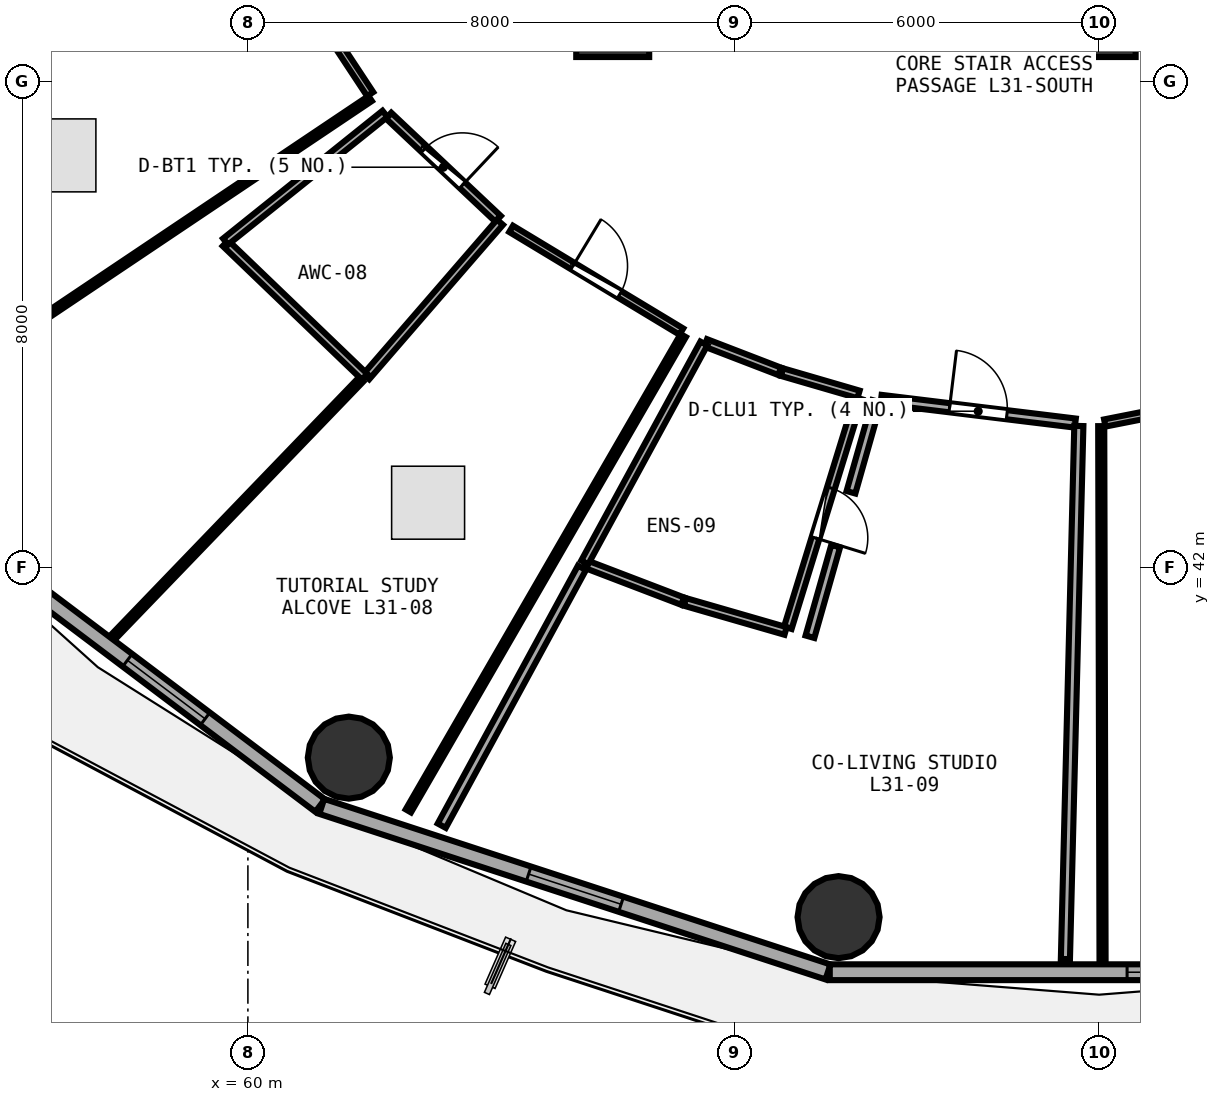
"""IFC4 building model, lengths in metres.
Left out: names, types, materials, properties, quantities, classifications, styles, units other than length and angle.
Written with IfcOpenShell. Run it as: python <this file> out.ifc"""

import sys

from ifc_helpers import new_model, si_unit, direction, frame, frame_2d, origin, origin_2d, place, context, subcontext, project, spatial, rectangle, circle, extrude, element, fill, save


model = new_model("IFC4")
c1 = context("Model", 3, precision=1e-05, world=origin(), true_north=direction((0.0, 1.0)))
c2 = subcontext(c1, "Body", "Model", "MODEL_VIEW")
j1 = project(units=[si_unit("LENGTHUNIT", "METRE"), si_unit("PLANEANGLEUNIT", "RADIAN")], contexts=[c1])
p1 = place(None, origin())
s1 = spatial("IfcSite", under=j1, at=p1, CompositionType="ELEMENT")
p2 = place(p1, origin())
s2 = spatial("IfcBuilding", under=s1, at=p2, CompositionType="ELEMENT")
p3 = place(p2, frame((0.0, 0.0, 121.35)))
s3 = spatial("IfcBuildingStorey", under=s2, at=p3, CompositionType="ELEMENT", Elevation=121.35)
for number, where, z_axis, x_axis in (
    (1, (66.0, 51.0, 0.0), (0.0, 0.0, 1.0), (1.0, 0.0, 0.0)),
    (2, (74.0, 51.0, 0.0), (0.0, 0.0, 1.0), (1.0, 0.0, 0.0)),
):
    element("IfcColumn", number, at=place(p3, frame(where, z_axis=z_axis, x_axis=x_axis)), inside=s3, PredefinedType="PILASTER", context=c2, shape_type="SweptSolid", body=[
        extrude(rectangle(XDim=1.2, YDim=1.2, at=origin_2d()), origin(), (0.0, 0.0, 1.0), 3.75),
    ])
for number, where, z_axis, x_axis in (
    (3, (61.66, 38.878, 0.0), (0.0, 0.0, 1.0), (1.0, 0.0, 0.0)),
    (4, (69.714, 36.255, 0.0), (0.0, 0.0, 1.0), (1.0, 0.0, 0.0)),
):
    element("IfcColumn", number, at=place(p3, frame(where, z_axis=z_axis, x_axis=x_axis)), inside=s3, PredefinedType="COLUMN", context=c2, shape_type="SweptSolid", body=[
        extrude(circle(Radius=0.675, at=origin_2d()), origin(), (0.0, 0.0, 1.0), 3.75),
    ])
p4 = place(p3, frame((54.401, 43.207, 0.0), z_axis=(0.0, 0.0, 1.0), x_axis=(0.798501507879, -0.601992808857, 0.0)))
e5 = element("IfcWall", 5, at=p4, inside=s3, PredefinedType="SOLIDWALL", context=c2, shape_type="SweptSolid", body=[
    extrude(rectangle(XDim=8.499, YDim=0.26, at=frame_2d((4.25, 0.0))), origin(), (0.0, 0.0, 1.0), 3.475),
])
p5 = place(p4, frame((4.53, 0.0, 0.85)))
e6 = element("IfcOpeningElement", 6, at=p5, cuts=e5, PredefinedType="OPENING", context=c2, shape_type="SweptSolid", body=[
    extrude(rectangle(XDim=1.6, YDim=1.45, at=frame_2d((0.8, 0.725))), frame((0.0, 0.14, 0.0), z_axis=(0.0, -1.0, 0.0), x_axis=(1.0, 0.0, 0.0)), (0.0, 0.0, 1.0), 0.28),
])
p6 = place(p3, frame((61.214, 38.077, 0.0), z_axis=(0.0, 0.0, 1.0), x_axis=(0.950471101963, -0.310812941064, 0.0)))
e7 = element("IfcWall", 7, at=p6, inside=s3, PredefinedType="SOLIDWALL", context=c2, shape_type="SweptSolid", body=[
    extrude(rectangle(XDim=8.76, YDim=0.26, at=frame_2d((4.38, 0.0))), origin(), (0.0, 0.0, 1.0), 3.475),
])
p7 = place(p6, frame((3.58, 0.0, 0.85)))
e8 = element("IfcOpeningElement", 8, at=p7, cuts=e7, PredefinedType="OPENING", context=c2, shape_type="SweptSolid", body=[
    extrude(rectangle(XDim=1.6, YDim=1.45, at=frame_2d((0.8, 0.725))), frame((0.0, 0.14, 0.0), z_axis=(0.0, -1.0, 0.0), x_axis=(1.0, 0.0, 0.0)), (0.0, 0.0, 1.0), 0.28),
])
p8 = place(p3, frame((69.57, 35.349, 0.0), z_axis=(0.0, 0.0, 1.0), x_axis=(1.0, 0.0, 0.0)))
e9 = element("IfcWall", 9, at=p8, inside=s3, PredefinedType="SOLIDWALL", context=c2, shape_type="SweptSolid", body=[
    extrude(rectangle(XDim=8.861, YDim=0.26, at=frame_2d((4.43, 0.0))), origin(), (0.0, 0.0, 1.0), 3.475),
])
p9 = place(p8, frame((4.89, 0.0, 0.85)))
e10 = element("IfcOpeningElement", 10, at=p9, cuts=e9, PredefinedType="OPENING", context=c2, shape_type="SweptSolid", body=[
    extrude(rectangle(XDim=1.6, YDim=1.45, at=frame_2d((0.8, 0.725))), frame((0.0, 0.14, 0.0), z_axis=(0.0, -1.0, 0.0), x_axis=(1.0, 0.0, 0.0)), (0.0, 0.0, 1.0), 0.28),
])
p10 = place(p3, frame((60.358, 52.293, 0.0), z_axis=(0.0, 0.0, 1.0), x_axis=(0.551050840628, -0.834471671804, 0.0)))
e11 = element("IfcWall", 11, at=p10, inside=s3, PredefinedType="PARTITIONING", context=c2, shape_type="SweptSolid", body=[
    extrude(rectangle(XDim=3.0, YDim=0.12, at=frame_2d((1.5, 0.0))), origin(), (0.0, 0.0, 1.0), 2.925),
])
p11 = place(p10, frame((1.05, 0.0, 0.0)))
e12 = element("IfcOpeningElement", 12, at=p11, cuts=e11, PredefinedType="OPENING", context=c2, shape_type="SweptSolid", body=[
    extrude(rectangle(XDim=0.9, YDim=2.08, at=frame_2d((0.45, 1.04))), frame((0.0, 0.07, 0.0), z_axis=(0.0, -1.0, 0.0), x_axis=(1.0, 0.0, 0.0)), (0.0, 0.0, 1.0), 0.14),
])
p12 = place(p3, frame((62.314, 49.437, 0.0), z_axis=(0.0, 0.0, 1.0), x_axis=(0.727704720547, -0.68589054498, 0.0)))
e13 = element("IfcWall", 13, at=p12, inside=s3, PredefinedType="PLUMBINGWALL", context=c2, shape_type="SweptSolid", body=[
    extrude(rectangle(XDim=2.476, YDim=0.13, at=frame_2d((1.238, 0.0))), origin(), (0.0, 0.0, 1.0), 2.925),
])
p13 = place(p12, frame((0.808, 0.0, 0.0)))
e14 = element("IfcOpeningElement", 14, at=p13, cuts=e13, PredefinedType="OPENING", context=c2, shape_type="SweptSolid", body=[
    extrude(rectangle(XDim=0.86, YDim=2.05, at=frame_2d((0.43, 1.025))), frame((0.0, 0.075, 0.0), z_axis=(0.0, -1.0, 0.0), x_axis=(1.0, 0.0, 0.0)), (0.0, 0.0, 1.0), 0.15),
])
p14 = place(p3, frame((64.329, 47.574, 0.0), z_axis=(0.0, 0.0, 1.0), x_axis=(0.8562252486, -0.516602674848, 0.0)))
e15 = element("IfcWall", 15, at=p14, inside=s3, PredefinedType="PARTITIONING", context=c2, shape_type="SweptSolid", body=[
    extrude(rectangle(XDim=3.269, YDim=0.12, at=frame_2d((1.635, 0.0))), origin(), (0.0, 0.0, 1.0), 2.925),
])
p15 = place(p14, frame((1.185, 0.0, 0.0)))
e16 = element("IfcOpeningElement", 16, at=p15, cuts=e15, PredefinedType="OPENING", context=c2, shape_type="SweptSolid", body=[
    extrude(rectangle(XDim=0.9, YDim=2.08, at=frame_2d((0.45, 1.04))), frame((0.0, 0.07, 0.0), z_axis=(0.0, -1.0, 0.0), x_axis=(1.0, 0.0, 0.0)), (0.0, 0.0, 1.0), 0.14),
])
p16 = place(p3, frame((70.044, 44.789, 0.0), z_axis=(0.0, 0.0, 1.0), x_axis=(-0.294737077858, -0.955578387646, 0.0)))
e17 = element("IfcWall", 17, at=p16, inside=s3, PredefinedType="PLUMBINGWALL", context=c2, shape_type="SweptSolid", body=[
    extrude(rectangle(XDim=3.951, YDim=0.13, at=frame_2d((1.976, 0.0))), origin(), (0.0, 0.0, 1.0), 3.175),
])
p17 = place(p16, frame((1.545, 0.0, 0.0)))
e18 = element("IfcOpeningElement", 18, at=p17, cuts=e17, PredefinedType="OPENING", context=c2, shape_type="SweptSolid", body=[
    extrude(rectangle(XDim=0.86, YDim=2.05, at=frame_2d((0.43, 1.025))), frame((0.0, 0.075, 0.0), z_axis=(0.0, -1.0, 0.0), x_axis=(1.0, 0.0, 0.0)), (0.0, 0.0, 1.0), 0.15),
])
p18 = place(p3, frame((70.414, 44.77, 0.0), z_axis=(0.0, 0.0, 1.0), x_axis=(0.992649213004, -0.12102702146, 0.0)))
e19 = element("IfcWall", 19, at=p18, inside=s3, PredefinedType="PARTITIONING", context=c2, shape_type="SweptSolid", body=[
    extrude(rectangle(XDim=3.218, YDim=0.15, at=frame_2d((1.609, 0.0))), origin(), (0.0, 0.0, 1.0), 3.48),
])
p19 = place(p18, frame((1.134, 0.0, 0.0)))
e20 = element("IfcOpeningElement", 20, at=p19, cuts=e19, PredefinedType="OPENING", context=c2, shape_type="SweptSolid", body=[
    extrude(rectangle(XDim=0.95, YDim=2.08, at=frame_2d((0.475, 1.04))), frame((0.0, 0.085, 0.0), z_axis=(0.0, -1.0, 0.0), x_axis=(1.0, 0.0, 0.0)), (0.0, 0.0, 1.0), 0.17),
])
p20 = place(p3, frame((74.093, 44.382, 0.0), z_axis=(0.0, 0.0, 1.0), x_axis=(0.981035031673, 0.193830510061, 0.0)))
e21 = element("IfcWall", 21, at=p20, inside=s3, PredefinedType="PARTITIONING", context=c2, shape_type="SweptSolid", body=[
    extrude(rectangle(XDim=6.184, YDim=0.12, at=frame_2d((3.092, 0.0))), origin(), (0.0, 0.0, 1.0), 3.235),
])
p21 = place(p20, frame((2.642, 0.0, 0.0)))
e22 = element("IfcOpeningElement", 22, at=p21, cuts=e21, PredefinedType="OPENING", context=c2, shape_type="SweptSolid", body=[
    extrude(rectangle(XDim=0.9, YDim=2.08, at=frame_2d((0.45, 1.04))), frame((0.0, 0.07, 0.0), z_axis=(0.0, -1.0, 0.0), x_axis=(1.0, 0.0, 0.0)), (0.0, 0.0, 1.0), 0.14),
])
p22 = place(p3, frame((62.011, 49.718, 0.0), z_axis=(0.0, 0.0, 1.0), x_axis=(-0.830433607217, -0.557117603388, 0.0)))
e23 = element("IfcWall", 23, at=p22, inside=s3, PredefinedType="PARTITIONING", context=c2, shape_type="SweptSolid", body=[
    extrude(rectangle(XDim=9.546, YDim=0.1, at=frame_2d((4.773, 0.0))), origin(), (0.0, 0.0, 1.0), 2.975),
])
p23 = place(p3, frame((51.219, 48.685, 0.0), z_axis=(0.0, 0.0, 1.0), x_axis=(0.927926926295, 0.372762148637, 0.0)))
e24 = element("IfcWall", 24, at=p23, inside=s3, PredefinedType="PARTITIONING", context=c2, shape_type="SweptSolid", body=[
    extrude(rectangle(XDim=6.044, YDim=0.1, at=frame_2d((3.022, 0.0))), origin(), (0.0, 0.0, 1.0), 2.925),
])
p24 = place(p3, frame((64.146, 47.683, 0.0), z_axis=(0.0, 0.0, 1.0), x_axis=(-0.654725816563, -0.75586645985, 0.0)))
e25 = element("IfcWall", 25, at=p24, inside=s3, PredefinedType="PLUMBINGWALL", context=c2, shape_type="SweptSolid", body=[
    extrude(rectangle(XDim=3.36, YDim=0.13, at=frame_2d((1.68, 0.0))), origin(), (0.0, 0.0, 1.0), 3.235),
])
p25 = place(p3, frame((61.919, 45.142, 0.0), z_axis=(0.0, 0.0, 1.0), x_axis=(-0.721319622767, 0.692602340316, 0.0)))
e26 = element("IfcWall", 26, at=p25, inside=s3, PredefinedType="PLUMBINGWALL", context=c2, shape_type="SweptSolid", body=[
    extrude(rectangle(XDim=3.171, YDim=0.13, at=frame_2d((1.585, 0.0))), origin(), (0.0, 0.0, 1.0), 2.925),
])
p26 = place(p3, frame((59.633, 47.365, 0.0), z_axis=(0.0, 0.0, 1.0), x_axis=(0.780343931947, 0.625350579974, 0.0)))
e27 = element("IfcWall", 27, at=p26, inside=s3, PredefinedType="PLUMBINGWALL", context=c2, shape_type="SweptSolid", body=[
    extrude(rectangle(XDim=3.36, YDim=0.13, at=frame_2d((1.68, 0.0))), origin(), (0.0, 0.0, 1.0), 3.235),
])
p27 = place(p3, frame((67.16, 45.819, 0.0), z_axis=(0.0, 0.0, 1.0), x_axis=(-0.500668535271, -0.865639080558, 0.0)))
e28 = element("IfcWall", 28, at=p27, inside=s3, PredefinedType="PARTITIONING", context=c2, shape_type="SweptSolid", body=[
    extrude(rectangle(XDim=9.03, YDim=0.1, at=frame_2d((4.515, 0.0))), origin(), (0.0, 0.0, 1.0), 2.925),
])
p28 = place(p3, frame((57.806, 40.885, 0.0), z_axis=(0.0, 0.0, 1.0), x_axis=(0.693697879067, 0.720266098451, 0.0)))
e29 = element("IfcWall", 29, at=p28, inside=s3, PredefinedType="PARTITIONING", context=c2, shape_type="SweptSolid", body=[
    extrude(rectangle(XDim=5.844, YDim=0.1, at=frame_2d((2.922, 0.0))), origin(), (0.0, 0.0, 1.0), 2.975),
])
p29 = place(p3, frame((67.528, 45.7, 0.0), z_axis=(0.0, 0.0, 1.0), x_axis=(0.933311844858, -0.359066846488, 0.0)))
e30 = element("IfcWall", 30, at=p29, inside=s3, PredefinedType="PLUMBINGWALL", context=c2, shape_type="SweptSolid", body=[
    extrude(rectangle(XDim=1.305, YDim=0.13, at=frame_2d((0.652, 0.0))), origin(), (0.0, 0.0, 1.0), 2.925),
])
p30 = place(p3, frame((68.783, 45.219, 0.0), z_axis=(0.0, 0.0, 1.0), x_axis=(0.960085412009, -0.279706992489, 0.0)))
e31 = element("IfcWall", 31, at=p30, inside=s3, PredefinedType="PLUMBINGWALL", context=c2, shape_type="SweptSolid", body=[
    extrude(rectangle(XDim=1.312, YDim=0.13, at=frame_2d((0.656, 0.0))), origin(), (0.0, 0.0, 1.0), 3.48),
])
p31 = place(p3, frame((68.843, 40.961, 0.0), z_axis=(0.0, 0.0, 1.0), x_axis=(-0.960750273448, 0.277414693321, 0.0)))
e32 = element("IfcWall", 32, at=p31, inside=s3, PredefinedType="PLUMBINGWALL", context=c2, shape_type="SweptSolid", body=[
    extrude(rectangle(XDim=1.723, YDim=0.13, at=frame_2d((0.862, 0.0))), origin(), (0.0, 0.0, 1.0), 2.925),
])
p32 = place(p3, frame((67.149, 41.452, 0.0), z_axis=(0.0, 0.0, 1.0), x_axis=(-0.934103540356, 0.357002207127, 0.0)))
e33 = element("IfcWall", 33, at=p32, inside=s3, PredefinedType="PLUMBINGWALL", context=c2, shape_type="SweptSolid", body=[
    extrude(rectangle(XDim=1.714, YDim=0.13, at=frame_2d((0.857, 0.0))), origin(), (0.0, 0.0, 1.0), 3.48),
])
p33 = place(p3, frame((65.54, 42.089, 0.0), z_axis=(0.0, 0.0, 1.0), x_axis=(0.478075883312, 0.878318535496, 0.0)))
e34 = element("IfcWall", 34, at=p33, inside=s3, PredefinedType="PLUMBINGWALL", context=c2, shape_type="SweptSolid", body=[
    extrude(rectangle(XDim=4.1, YDim=0.13, at=frame_2d((2.05, 0.0))), origin(), (0.0, 0.0, 1.0), 2.925),
])
p34 = place(p3, frame((73.666, 44.333, 0.0), z_axis=(0.0, 0.0, 1.0), x_axis=(-0.025193894125, -0.999682583473, 0.0)))
e35 = element("IfcWall", 35, at=p34, inside=s3, PredefinedType="PARTITIONING", context=c2, shape_type="SweptSolid", body=[
    extrude(rectangle(XDim=8.77, YDim=0.15, at=frame_2d((4.385, 0.0))), origin(), (0.0, 0.0, 1.0), 2.975),
])
p35 = place(p3, frame((63.188, 37.759, 0.0), z_axis=(0.0, 0.0, 1.0), x_axis=(0.477678819353, 0.878534544307, 0.0)))
e36 = element("IfcWall", 36, at=p35, inside=s3, PredefinedType="PARTITIONING", context=c2, shape_type="SweptSolid", body=[
    extrude(rectangle(XDim=4.827, YDim=0.15, at=frame_2d((2.414, 0.0))), origin(), (0.0, 0.0, 1.0), 2.975),
])
p36 = place(p3, frame((69.244, 40.866, 0.0), z_axis=(0.0, 0.0, 1.0), x_axis=(0.273076599945, 0.961992292361, 0.0)))
e37 = element("IfcWall", 37, at=p36, inside=s3, PredefinedType="PARTITIONING", context=c2, shape_type="SweptSolid", body=[
    extrude(rectangle(XDim=1.549, YDim=0.15, at=frame_2d((0.775, 0.0))), origin(), (0.0, 0.0, 1.0), 3.175),
])
p37 = place(p3, frame((69.918, 43.242, 0.0), z_axis=(0.0, 0.0, 1.0), x_axis=(0.273103794408, 0.961984572371, 0.0)))
e38 = element("IfcWall", 38, at=p37, inside=s3, PredefinedType="PARTITIONING", context=c2, shape_type="SweptSolid", body=[
    extrude(rectangle(XDim=1.555, YDim=0.15, at=frame_2d((0.778, 0.0))), origin(), (0.0, 0.0, 1.0), 3.48),
])
p38 = place(p3, frame((74.056, 35.56, 0.0), z_axis=(0.0, 0.0, 1.0), x_axis=(-0.00247758273, 0.999996930787, 0.0)))
e39 = element("IfcWall", 39, at=p38, inside=s3, PredefinedType="PARTITIONING", context=c2, shape_type="SweptSolid", body=[
    extrude(rectangle(XDim=8.77, YDim=0.1, at=frame_2d((4.385, 0.0))), origin(), (0.0, 0.0, 1.0), 2.975),
])
p39 = place(p5, origin())
e40 = element("IfcWindow", 40, at=p39, inside=s3, PartitioningType="SINGLE_PANEL", PredefinedType="WINDOW", context=c2, shape_type="SweptSolid", body=[
    extrude(rectangle(XDim=1.6, YDim=1.45, at=frame_2d((0.8, 0.725))), frame((0.0, 0.03, 0.0), z_axis=(0.0, -1.0, 0.0), x_axis=(1.0, 0.0, 0.0)), (0.0, 0.0, 1.0), 0.06),
])
fill(e6, e40)
p40 = place(p7, origin())
e41 = element("IfcWindow", 41, at=p40, inside=s3, PartitioningType="SINGLE_PANEL", PredefinedType="WINDOW", context=c2, shape_type="SweptSolid", body=[
    extrude(rectangle(XDim=1.6, YDim=1.45, at=frame_2d((0.8, 0.725))), frame((0.0, 0.03, 0.0), z_axis=(0.0, -1.0, 0.0), x_axis=(1.0, 0.0, 0.0)), (0.0, 0.0, 1.0), 0.06),
])
fill(e8, e41)
p41 = place(p9, origin())
e42 = element("IfcWindow", 42, at=p41, inside=s3, PartitioningType="SINGLE_PANEL", PredefinedType="WINDOW", context=c2, shape_type="SweptSolid", body=[
    extrude(rectangle(XDim=1.6, YDim=1.45, at=frame_2d((0.8, 0.725))), frame((0.0, 0.03, 0.0), z_axis=(0.0, -1.0, 0.0), x_axis=(1.0, 0.0, 0.0)), (0.0, 0.0, 1.0), 0.06),
])
fill(e10, e42)
p42 = place(p13, origin())
e43 = element("IfcDoor", 43, at=p42, inside=s3, OperationType="SINGLE_SWING_RIGHT", PredefinedType="DOOR", context=c2, shape_type="SweptSolid", body=[
    extrude(rectangle(XDim=0.86, YDim=2.05, at=frame_2d((0.43, 1.025))), frame((0.0, 0.025, 0.0), z_axis=(0.0, -1.0, 0.0), x_axis=(1.0, 0.0, 0.0)), (0.0, 0.0, 1.0), 0.05),
])
fill(e14, e43)
p43 = place(p15, origin())
e44 = element("IfcDoor", 44, at=p43, inside=s3, OperationType="SINGLE_SWING_LEFT", PredefinedType="DOOR", context=c2, shape_type="SweptSolid", body=[
    extrude(rectangle(XDim=0.9, YDim=2.08, at=frame_2d((0.45, 1.04))), frame((0.0, 0.025, 0.0), z_axis=(0.0, -1.0, 0.0), x_axis=(1.0, 0.0, 0.0)), (0.0, 0.0, 1.0), 0.05),
])
fill(e16, e44)
p44 = place(p17, origin())
e45 = element("IfcDoor", 45, at=p44, inside=s3, OperationType="SINGLE_SWING_RIGHT", PredefinedType="DOOR", context=c2, shape_type="SweptSolid", body=[
    extrude(rectangle(XDim=0.86, YDim=2.05, at=frame_2d((0.43, 1.025))), frame((0.0, 0.025, 0.0), z_axis=(0.0, -1.0, 0.0), x_axis=(1.0, 0.0, 0.0)), (0.0, 0.0, 1.0), 0.05),
])
fill(e18, e45)
p45 = place(p19, origin())
e46 = element("IfcDoor", 46, at=p45, inside=s3, OperationType="SINGLE_SWING_LEFT", PredefinedType="DOOR", context=c2, shape_type="SweptSolid", body=[
    extrude(rectangle(XDim=0.95, YDim=2.08, at=frame_2d((0.475, 1.04))), frame((0.0, 0.025, 0.0), z_axis=(0.0, -1.0, 0.0), x_axis=(1.0, 0.0, 0.0)), (0.0, 0.0, 1.0), 0.05),
])
fill(e20, e46)
save(model, sys.argv[1])
